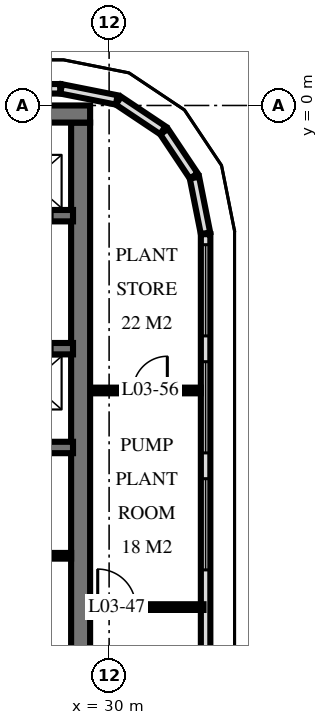
"""IFC4 building model, lengths in metres.
Left out: names, types, materials, properties, quantities, classifications, styles, units other than length and angle.
Written with IfcOpenShell. Run it as: python <this file> out.ifc"""

import sys

from ifc_helpers import new_model, si_unit, direction, frame, frame_2d, origin, place, context, subcontext, project, spatial, rectangle, extrude, element, fill, save


model = new_model("IFC4")
c1 = context("Model", 3, precision=1e-05, world=origin(), true_north=direction((0.0, 1.0)))
c2 = subcontext(c1, "Body", "Model", "MODEL_VIEW")
j1 = project(units=[si_unit("LENGTHUNIT", "METRE"), si_unit("PLANEANGLEUNIT", "RADIAN")], contexts=[c1])
p1 = place(None, origin())
s1 = spatial("IfcSite", under=j1, at=p1, CompositionType="ELEMENT")
p2 = place(p1, origin())
s2 = spatial("IfcBuilding", under=s1, at=p2, CompositionType="ELEMENT")
p3 = place(p2, frame((0.0, 0.0, 18.0)))
s3 = spatial("IfcBuildingStorey", under=s2, at=p3, CompositionType="ELEMENT", Elevation=18.0)
p4 = place(p3, frame((10.0, -0.225, 0.0), z_axis=(0.0, 0.0, 1.0), x_axis=(1.0, 0.0, 0.0)))
e1 = element("IfcWall", 1, at=p4, inside=s3, PredefinedType="SHEAR", context=c2, shape_type="SweptSolid", body=[
    extrude(rectangle(XDim=19.5, YDim=0.45, at=frame_2d((9.75, 0.0))), origin(), (0.0, 0.0, 1.0), 6.0),
])
p5 = place(p3, frame((29.25, -14.55, 0.0), z_axis=(0.0, 0.0, 1.0), x_axis=(0.0, 1.0, 0.0)))
e2 = element("IfcWall", 2, at=p5, inside=s3, PredefinedType="SHEAR", context=c2, shape_type="SweptSolid", body=[
    extrude(rectangle(XDim=14.1, YDim=0.5, at=frame_2d((7.05, 0.0))), origin(), (0.0, 0.0, 1.0), 6.0),
])
p6 = place(p3, frame((10.35, -2.9, 0.0), z_axis=(0.0, 0.0, 1.0), x_axis=(1.0, 0.0, 0.0)))
e3 = element("IfcWall", 3, at=p6, inside=s3, PredefinedType="SHEAR", context=c2, shape_type="SweptSolid", body=[
    extrude(rectangle(XDim=18.7, YDim=0.3, at=frame_2d((9.35, 0.0))), origin(), (0.0, 0.0, 1.0), 6.0),
])
p7 = place(p6, frame((14.65, 0.0, 0.0)))
e4 = element("IfcOpeningElement", 4, at=p7, cuts=e3, PredefinedType="OPENING", context=c2, shape_type="SweptSolid", body=[
    extrude(rectangle(XDim=1.1, YDim=2.1, at=frame_2d((0.55, 1.05))), frame((0.0, 0.16, 0.0), z_axis=(0.0, -1.0, 0.0), x_axis=(1.0, 0.0, 0.0)), (0.0, 0.0, 1.0), 0.32),
])
p8 = place(p6, frame((17.05, 0.0, 0.0)))
e5 = element("IfcOpeningElement", 5, at=p8, cuts=e3, PredefinedType="OPENING", context=c2, shape_type="SweptSolid", body=[
    extrude(rectangle(XDim=1.1, YDim=2.1, at=frame_2d((0.55, 1.05))), frame((0.0, 0.16, 0.0), z_axis=(0.0, -1.0, 0.0), x_axis=(1.0, 0.0, 0.0)), (0.0, 0.0, 1.0), 0.32),
])
p9 = place(p6, frame((6.188, 0.0, 0.0)))
e6 = element("IfcOpeningElement", 6, at=p9, cuts=e3, PredefinedType="OPENING", context=c2, shape_type="SweptSolid", body=[
    extrude(rectangle(XDim=0.9, YDim=2.1, at=frame_2d((0.45, 1.05))), frame((0.0, 0.16, 0.0), z_axis=(0.0, -1.0, 0.0), x_axis=(1.0, 0.0, 0.0)), (0.0, 0.0, 1.0), 0.32),
])
p10 = place(p6, frame((7.613, 0.0, 0.0)))
e7 = element("IfcOpeningElement", 7, at=p10, cuts=e3, PredefinedType="OPENING", context=c2, shape_type="SweptSolid", body=[
    extrude(rectangle(XDim=0.9, YDim=2.1, at=frame_2d((0.45, 1.05))), frame((0.0, 0.16, 0.0), z_axis=(0.0, -1.0, 0.0), x_axis=(1.0, 0.0, 0.0)), (0.0, 0.0, 1.0), 0.32),
])
p11 = place(p6, frame((0.137, 0.0, 0.0)))
e8 = element("IfcOpeningElement", 8, at=p11, cuts=e3, PredefinedType="OPENING", context=c2, shape_type="SweptSolid", body=[
    extrude(rectangle(XDim=1.0, YDim=2.1, at=frame_2d((0.5, 1.05))), frame((0.0, 0.16, 0.0), z_axis=(0.0, -1.0, 0.0), x_axis=(1.0, 0.0, 0.0)), (0.0, 0.0, 1.0), 0.32),
])
p12 = place(p6, frame((1.562, 0.0, 0.0)))
e9 = element("IfcOpeningElement", 9, at=p12, cuts=e3, PredefinedType="OPENING", context=c2, shape_type="SweptSolid", body=[
    extrude(rectangle(XDim=1.0, YDim=2.1, at=frame_2d((0.5, 1.05))), frame((0.0, 0.16, 0.0), z_axis=(0.0, -1.0, 0.0), x_axis=(1.0, 0.0, 0.0)), (0.0, 0.0, 1.0), 0.32),
])
p13 = place(p6, frame((3.85, 0.0, 0.0)))
e10 = element("IfcOpeningElement", 10, at=p13, cuts=e3, PredefinedType="OPENING", context=c2, shape_type="SweptSolid", body=[
    extrude(rectangle(XDim=1.0, YDim=2.1, at=frame_2d((0.5, 1.05))), frame((0.0, 0.16, 0.0), z_axis=(0.0, -1.0, 0.0), x_axis=(1.0, 0.0, 0.0)), (0.0, 0.0, 1.0), 0.32),
])
p14 = place(p6, frame((12.1, 0.0, 0.0)))
e11 = element("IfcOpeningElement", 11, at=p14, cuts=e3, PredefinedType="OPENING", context=c2, shape_type="SweptSolid", body=[
    extrude(rectangle(XDim=1.0, YDim=2.1, at=frame_2d((0.5, 1.05))), frame((0.0, 0.16, 0.0), z_axis=(0.0, -1.0, 0.0), x_axis=(1.0, 0.0, 0.0)), (0.0, 0.0, 1.0), 0.32),
])
p15 = place(p3, frame((10.35, -6.4, 0.0), z_axis=(0.0, 0.0, 1.0), x_axis=(1.0, 0.0, 0.0)))
e12 = element("IfcWall", 12, at=p15, inside=s3, PredefinedType="SHEAR", context=c2, shape_type="SweptSolid", body=[
    extrude(rectangle(XDim=18.7, YDim=0.3, at=frame_2d((9.35, 0.0))), origin(), (0.0, 0.0, 1.0), 6.0),
])
p16 = place(p15, frame((14.65, 0.0, 0.0)))
e13 = element("IfcOpeningElement", 13, at=p16, cuts=e12, PredefinedType="OPENING", context=c2, shape_type="SweptSolid", body=[
    extrude(rectangle(XDim=1.1, YDim=2.1, at=frame_2d((0.55, 1.05))), frame((0.0, 0.16, 0.0), z_axis=(0.0, -1.0, 0.0), x_axis=(1.0, 0.0, 0.0)), (0.0, 0.0, 1.0), 0.32),
])
p17 = place(p15, frame((17.05, 0.0, 0.0)))
e14 = element("IfcOpeningElement", 14, at=p17, cuts=e12, PredefinedType="OPENING", context=c2, shape_type="SweptSolid", body=[
    extrude(rectangle(XDim=1.1, YDim=2.1, at=frame_2d((0.55, 1.05))), frame((0.0, 0.16, 0.0), z_axis=(0.0, -1.0, 0.0), x_axis=(1.0, 0.0, 0.0)), (0.0, 0.0, 1.0), 0.32),
])
p18 = place(p15, frame((6.8, 0.0, 0.0)))
e15 = element("IfcOpeningElement", 15, at=p18, cuts=e12, PredefinedType="OPENING", context=c2, shape_type="SweptSolid", body=[
    extrude(rectangle(XDim=1.1, YDim=2.1, at=frame_2d((0.55, 1.05))), frame((0.0, 0.16, 0.0), z_axis=(0.0, -1.0, 0.0), x_axis=(1.0, 0.0, 0.0)), (0.0, 0.0, 1.0), 0.32),
])
p19 = place(p15, frame((12.1, 0.0, 0.0)))
e16 = element("IfcOpeningElement", 16, at=p19, cuts=e12, PredefinedType="OPENING", context=c2, shape_type="SweptSolid", body=[
    extrude(rectangle(XDim=1.0, YDim=2.1, at=frame_2d((0.5, 1.05))), frame((0.0, 0.16, 0.0), z_axis=(0.0, -1.0, 0.0), x_axis=(1.0, 0.0, 0.0)), (0.0, 0.0, 1.0), 0.32),
])
p20 = place(p3, frame((10.35, -9.0, 0.0), z_axis=(0.0, 0.0, 1.0), x_axis=(1.0, 0.0, 0.0)))
e17 = element("IfcWall", 17, at=p20, inside=s3, PredefinedType="SHEAR", context=c2, shape_type="SweptSolid", body=[
    extrude(rectangle(XDim=18.7, YDim=0.3, at=frame_2d((9.35, 0.0))), origin(), (0.0, 0.0, 1.0), 6.0),
])
p21 = place(p20, frame((3.8, 0.0, 0.0)))
e18 = element("IfcOpeningElement", 18, at=p21, cuts=e17, PredefinedType="OPENING", context=c2, shape_type="SweptSolid", body=[
    extrude(rectangle(XDim=1.1, YDim=2.1, at=frame_2d((0.55, 1.05))), frame((0.0, 0.16, 0.0), z_axis=(0.0, -1.0, 0.0), x_axis=(1.0, 0.0, 0.0)), (0.0, 0.0, 1.0), 0.32),
])
p22 = place(p3, frame((32.537, -3.363, 0.0), z_axis=(0.0, 0.0, 1.0), x_axis=(-0.195014837095, 0.980800292268, 0.0)))
e19 = element("IfcWall", 19, at=p22, inside=s3, PredefinedType="SOLIDWALL", context=c2, shape_type="SweptSolid", body=[
    extrude(rectangle(XDim=1.492, YDim=0.25, at=frame_2d((0.746, 0.0))), origin(), (0.0, 0.0, 1.0), 5.72),
])
for number, where, z_axis, x_axis in (
    (20, (32.227, -1.854, 0.0), (0.0, 0.0, 1.0), (-0.556, 0.831, 0.0)),
    (21, (31.413, -0.653, 0.0), (0.0, 0.0, 1.0), (-0.831, 0.556, 0.0)),
):
    element("IfcWall", number, at=place(p3, frame(where, z_axis=z_axis, x_axis=x_axis)), inside=s3, PredefinedType="SOLIDWALL", context=c2, shape_type="SweptSolid", body=[
        extrude(rectangle(XDim=1.403, YDim=0.25, at=frame_2d((0.702, 0.0))), origin(), (0.0, 0.0, 1.0), 5.72),
    ])
p23 = place(p3, frame((30.201, 0.146, 0.0), z_axis=(0.0, 0.0, 1.0), x_axis=(-0.980800292268, 0.195014837095, 0.0)))
e22 = element("IfcWall", 22, at=p23, inside=s3, PredefinedType="SOLIDWALL", context=c2, shape_type="SweptSolid", body=[
    extrude(rectangle(XDim=1.492, YDim=0.25, at=frame_2d((0.746, 0.0))), origin(), (0.0, 0.0, 1.0), 5.72),
])
p24 = place(p3, frame((28.713, 0.439, 0.0), z_axis=(0.0, 0.0, 1.0), x_axis=(-1.0, 0.0, 0.0)))
e23 = element("IfcWall", 23, at=p24, inside=s3, PredefinedType="SOLIDWALL", context=c2, shape_type="SweptSolid", body=[
    extrude(rectangle(XDim=57.426, YDim=0.25, at=frame_2d((28.713, 0.0))), origin(), (0.0, 0.0, 1.0), 5.72),
])
p25 = place(p24, frame((0.252, 0.0, 0.858)))
e24 = element("IfcOpeningElement", 24, at=p25, cuts=e23, PredefinedType="OPENING", context=c2, shape_type="SweptSolid", body=[
    extrude(rectangle(XDim=2.4, YDim=3.6, at=frame_2d((1.2, 1.8))), frame((0.0, 0.135, 0.0), z_axis=(0.0, -1.0, 0.0), x_axis=(1.0, 0.0, 0.0)), (0.0, 0.0, 1.0), 0.27),
])
p26 = place(p24, frame((3.281, 0.0, 0.858)))
e25 = element("IfcOpeningElement", 25, at=p26, cuts=e23, PredefinedType="OPENING", context=c2, shape_type="SweptSolid", body=[
    extrude(rectangle(XDim=2.4, YDim=3.6, at=frame_2d((1.2, 1.8))), frame((0.0, 0.135, 0.0), z_axis=(0.0, -1.0, 0.0), x_axis=(1.0, 0.0, 0.0)), (0.0, 0.0, 1.0), 0.27),
])
p27 = place(p24, frame((6.31, 0.0, 0.858)))
e26 = element("IfcOpeningElement", 26, at=p27, cuts=e23, PredefinedType="OPENING", context=c2, shape_type="SweptSolid", body=[
    extrude(rectangle(XDim=2.4, YDim=3.6, at=frame_2d((1.2, 1.8))), frame((0.0, 0.135, 0.0), z_axis=(0.0, -1.0, 0.0), x_axis=(1.0, 0.0, 0.0)), (0.0, 0.0, 1.0), 0.27),
])
p28 = place(p24, frame((9.339, 0.0, 0.858)))
e27 = element("IfcOpeningElement", 27, at=p28, cuts=e23, PredefinedType="OPENING", context=c2, shape_type="SweptSolid", body=[
    extrude(rectangle(XDim=2.4, YDim=3.6, at=frame_2d((1.2, 1.8))), frame((0.0, 0.135, 0.0), z_axis=(0.0, -1.0, 0.0), x_axis=(1.0, 0.0, 0.0)), (0.0, 0.0, 1.0), 0.27),
])
p29 = place(p24, frame((12.368, 0.0, 0.858)))
e28 = element("IfcOpeningElement", 28, at=p29, cuts=e23, PredefinedType="OPENING", context=c2, shape_type="SweptSolid", body=[
    extrude(rectangle(XDim=2.4, YDim=3.6, at=frame_2d((1.2, 1.8))), frame((0.0, 0.135, 0.0), z_axis=(0.0, -1.0, 0.0), x_axis=(1.0, 0.0, 0.0)), (0.0, 0.0, 1.0), 0.27),
])
p30 = place(p24, frame((15.397, 0.0, 0.858)))
e29 = element("IfcOpeningElement", 29, at=p30, cuts=e23, PredefinedType="OPENING", context=c2, shape_type="SweptSolid", body=[
    extrude(rectangle(XDim=2.4, YDim=3.6, at=frame_2d((1.2, 1.8))), frame((0.0, 0.135, 0.0), z_axis=(0.0, -1.0, 0.0), x_axis=(1.0, 0.0, 0.0)), (0.0, 0.0, 1.0), 0.27),
])
p31 = place(p24, frame((18.426, 0.0, 0.858)))
e30 = element("IfcOpeningElement", 30, at=p31, cuts=e23, PredefinedType="OPENING", context=c2, shape_type="SweptSolid", body=[
    extrude(rectangle(XDim=2.4, YDim=3.6, at=frame_2d((1.2, 1.8))), frame((0.0, 0.135, 0.0), z_axis=(0.0, -1.0, 0.0), x_axis=(1.0, 0.0, 0.0)), (0.0, 0.0, 1.0), 0.27),
])
p32 = place(p24, frame((21.455, 0.0, 0.858)))
e31 = element("IfcOpeningElement", 31, at=p32, cuts=e23, PredefinedType="OPENING", context=c2, shape_type="SweptSolid", body=[
    extrude(rectangle(XDim=2.4, YDim=3.6, at=frame_2d((1.2, 1.8))), frame((0.0, 0.135, 0.0), z_axis=(0.0, -1.0, 0.0), x_axis=(1.0, 0.0, 0.0)), (0.0, 0.0, 1.0), 0.27),
])
p33 = place(p24, frame((24.484, 0.0, 0.858)))
e32 = element("IfcOpeningElement", 32, at=p33, cuts=e23, PredefinedType="OPENING", context=c2, shape_type="SweptSolid", body=[
    extrude(rectangle(XDim=2.4, YDim=3.6, at=frame_2d((1.2, 1.8))), frame((0.0, 0.135, 0.0), z_axis=(0.0, -1.0, 0.0), x_axis=(1.0, 0.0, 0.0)), (0.0, 0.0, 1.0), 0.27),
])
p34 = place(p24, frame((27.513, 0.0, 0.858)))
e33 = element("IfcOpeningElement", 33, at=p34, cuts=e23, PredefinedType="OPENING", context=c2, shape_type="SweptSolid", body=[
    extrude(rectangle(XDim=2.4, YDim=3.6, at=frame_2d((1.2, 1.8))), frame((0.0, 0.135, 0.0), z_axis=(0.0, -1.0, 0.0), x_axis=(1.0, 0.0, 0.0)), (0.0, 0.0, 1.0), 0.27),
])
p35 = place(p24, frame((30.542, 0.0, 0.858)))
e34 = element("IfcOpeningElement", 34, at=p35, cuts=e23, PredefinedType="OPENING", context=c2, shape_type="SweptSolid", body=[
    extrude(rectangle(XDim=2.4, YDim=3.6, at=frame_2d((1.2, 1.8))), frame((0.0, 0.135, 0.0), z_axis=(0.0, -1.0, 0.0), x_axis=(1.0, 0.0, 0.0)), (0.0, 0.0, 1.0), 0.27),
])
p36 = place(p24, frame((33.571, 0.0, 0.858)))
e35 = element("IfcOpeningElement", 35, at=p36, cuts=e23, PredefinedType="OPENING", context=c2, shape_type="SweptSolid", body=[
    extrude(rectangle(XDim=2.4, YDim=3.6, at=frame_2d((1.2, 1.8))), frame((0.0, 0.135, 0.0), z_axis=(0.0, -1.0, 0.0), x_axis=(1.0, 0.0, 0.0)), (0.0, 0.0, 1.0), 0.27),
])
p37 = place(p24, frame((36.6, 0.0, 0.858)))
e36 = element("IfcOpeningElement", 36, at=p37, cuts=e23, PredefinedType="OPENING", context=c2, shape_type="SweptSolid", body=[
    extrude(rectangle(XDim=2.4, YDim=3.6, at=frame_2d((1.2, 1.8))), frame((0.0, 0.135, 0.0), z_axis=(0.0, -1.0, 0.0), x_axis=(1.0, 0.0, 0.0)), (0.0, 0.0, 1.0), 0.27),
])
p38 = place(p24, frame((39.629, 0.0, 0.858)))
e37 = element("IfcOpeningElement", 37, at=p38, cuts=e23, PredefinedType="OPENING", context=c2, shape_type="SweptSolid", body=[
    extrude(rectangle(XDim=2.4, YDim=3.6, at=frame_2d((1.2, 1.8))), frame((0.0, 0.135, 0.0), z_axis=(0.0, -1.0, 0.0), x_axis=(1.0, 0.0, 0.0)), (0.0, 0.0, 1.0), 0.27),
])
p39 = place(p24, frame((42.658, 0.0, 0.858)))
e38 = element("IfcOpeningElement", 38, at=p39, cuts=e23, PredefinedType="OPENING", context=c2, shape_type="SweptSolid", body=[
    extrude(rectangle(XDim=2.4, YDim=3.6, at=frame_2d((1.2, 1.8))), frame((0.0, 0.135, 0.0), z_axis=(0.0, -1.0, 0.0), x_axis=(1.0, 0.0, 0.0)), (0.0, 0.0, 1.0), 0.27),
])
p40 = place(p24, frame((45.687, 0.0, 0.858)))
e39 = element("IfcOpeningElement", 39, at=p40, cuts=e23, PredefinedType="OPENING", context=c2, shape_type="SweptSolid", body=[
    extrude(rectangle(XDim=2.4, YDim=3.6, at=frame_2d((1.2, 1.8))), frame((0.0, 0.135, 0.0), z_axis=(0.0, -1.0, 0.0), x_axis=(1.0, 0.0, 0.0)), (0.0, 0.0, 1.0), 0.27),
])
p41 = place(p24, frame((48.716, 0.0, 0.858)))
e40 = element("IfcOpeningElement", 40, at=p41, cuts=e23, PredefinedType="OPENING", context=c2, shape_type="SweptSolid", body=[
    extrude(rectangle(XDim=2.4, YDim=3.6, at=frame_2d((1.2, 1.8))), frame((0.0, 0.135, 0.0), z_axis=(0.0, -1.0, 0.0), x_axis=(1.0, 0.0, 0.0)), (0.0, 0.0, 1.0), 0.27),
])
p42 = place(p24, frame((51.745, 0.0, 0.858)))
e41 = element("IfcOpeningElement", 41, at=p42, cuts=e23, PredefinedType="OPENING", context=c2, shape_type="SweptSolid", body=[
    extrude(rectangle(XDim=2.4, YDim=3.6, at=frame_2d((1.2, 1.8))), frame((0.0, 0.135, 0.0), z_axis=(0.0, -1.0, 0.0), x_axis=(1.0, 0.0, 0.0)), (0.0, 0.0, 1.0), 0.27),
])
p43 = place(p24, frame((54.774, 0.0, 0.858)))
e42 = element("IfcOpeningElement", 42, at=p43, cuts=e23, PredefinedType="OPENING", context=c2, shape_type="SweptSolid", body=[
    extrude(rectangle(XDim=2.4, YDim=3.6, at=frame_2d((1.2, 1.8))), frame((0.0, 0.135, 0.0), z_axis=(0.0, -1.0, 0.0), x_axis=(1.0, 0.0, 0.0)), (0.0, 0.0, 1.0), 0.27),
])
p44 = place(p3, frame((32.539, -15.639, 0.0), z_axis=(0.0, 0.0, 1.0), x_axis=(0.0, 1.0, 0.0)))
e43 = element("IfcWall", 43, at=p44, inside=s3, PredefinedType="SOLIDWALL", context=c2, shape_type="SweptSolid", body=[
    extrude(rectangle(XDim=12.252, YDim=0.25, at=frame_2d((6.126, 0.0))), origin(), (0.0, 0.0, 1.0), 5.72),
])
p45 = place(p44, frame((3.418, 0.0, 1.005)))
e44 = element("IfcOpeningElement", 44, at=p45, cuts=e43, PredefinedType="OPENING", context=c2, shape_type="SweptSolid", body=[
    extrude(rectangle(XDim=2.4, YDim=3.6, at=frame_2d((1.2, 1.8))), frame((0.0, 0.135, 0.0), z_axis=(0.0, -1.0, 0.0), x_axis=(1.0, 0.0, 0.0)), (0.0, 0.0, 1.0), 0.27),
])
p46 = place(p44, frame((6.497, 0.0, 1.005)))
e45 = element("IfcOpeningElement", 45, at=p46, cuts=e43, PredefinedType="OPENING", context=c2, shape_type="SweptSolid", body=[
    extrude(rectangle(XDim=2.4, YDim=3.6, at=frame_2d((1.2, 1.8))), frame((0.0, 0.135, 0.0), z_axis=(0.0, -1.0, 0.0), x_axis=(1.0, 0.0, 0.0)), (0.0, 0.0, 1.0), 0.27),
])
p47 = place(p44, frame((9.575, 0.0, 1.005)))
e46 = element("IfcOpeningElement", 46, at=p47, cuts=e43, PredefinedType="OPENING", context=c2, shape_type="SweptSolid", body=[
    extrude(rectangle(XDim=2.4, YDim=3.6, at=frame_2d((1.2, 1.8))), frame((0.0, 0.135, 0.0), z_axis=(0.0, -1.0, 0.0), x_axis=(1.0, 0.0, 0.0)), (0.0, 0.0, 1.0), 0.27),
])
p48 = place(p3, frame((24.5, -11.85, 0.0), z_axis=(0.0, 0.0, 1.0), x_axis=(1.0, 0.0, 0.0)))
e47 = element("IfcWall", 47, at=p48, inside=s3, PredefinedType="PARTITIONING", context=c2, shape_type="SweptSolid", body=[
    extrude(rectangle(XDim=4.5, YDim=0.15, at=frame_2d((2.25, 0.0))), origin(), (0.0, 0.0, 1.0), 5.7),
])
p49 = place(p48, frame((1.75, 0.0, 0.0)))
e48 = element("IfcOpeningElement", 48, at=p49, cuts=e47, PredefinedType="OPENING", context=c2, shape_type="SweptSolid", body=[
    extrude(rectangle(XDim=1.0, YDim=2.1, at=frame_2d((0.5, 1.05))), frame((0.0, 0.085, 0.0), z_axis=(0.0, -1.0, 0.0), x_axis=(1.0, 0.0, 0.0)), (0.0, 0.0, 1.0), 0.17),
])
p50 = place(p3, frame((29.55, -13.2, 0.0), z_axis=(0.0, 0.0, 1.0), x_axis=(1.0, 0.0, 0.0)))
e49 = element("IfcWall", 49, at=p50, inside=s3, PredefinedType="PARTITIONING", context=c2, shape_type="SweptSolid", body=[
    extrude(rectangle(XDim=2.934, YDim=0.15, at=frame_2d((1.467, 0.0))), origin(), (0.0, 0.0, 1.0), 5.55),
])
p51 = place(p50, frame((0.15, 0.0, 0.0)))
e50 = element("IfcOpeningElement", 50, at=p51, cuts=e49, PredefinedType="OPENING", context=c2, shape_type="SweptSolid", body=[
    extrude(rectangle(XDim=1.0, YDim=2.1, at=frame_2d((0.5, 1.05))), frame((0.0, 0.085, 0.0), z_axis=(0.0, -1.0, 0.0), x_axis=(1.0, 0.0, 0.0)), (0.0, 0.0, 1.0), 0.17),
])
p52 = place(p3, frame((29.55, -7.5, 0.0), z_axis=(0.0, 0.0, 1.0), x_axis=(1.0, 0.0, 0.0)))
e51 = element("IfcWall", 51, at=p52, inside=s3, PredefinedType="PARTITIONING", context=c2, shape_type="SweptSolid", body=[
    extrude(rectangle(XDim=2.863, YDim=0.15, at=frame_2d((1.431, 0.0))), origin(), (0.0, 0.0, 1.0), 5.55),
])
p53 = place(p52, frame((1.082, 0.0, 0.0)))
e52 = element("IfcOpeningElement", 52, at=p53, cuts=e51, PredefinedType="OPENING", context=c2, shape_type="SweptSolid", body=[
    extrude(rectangle(XDim=0.9, YDim=2.1, at=frame_2d((0.45, 1.05))), frame((0.0, 0.085, 0.0), z_axis=(0.0, -1.0, 0.0), x_axis=(1.0, 0.0, 0.0)), (0.0, 0.0, 1.0), 0.17),
])
p54 = place(p45, origin())
e53 = element("IfcWindow", 53, at=p54, inside=s3, PartitioningType="SINGLE_PANEL", PredefinedType="USERDEFINED", context=c2, shape_type="SweptSolid", body=[
    extrude(rectangle(XDim=2.4, YDim=3.6, at=frame_2d((1.2, 1.8))), frame((0.0, 0.125, 0.0), z_axis=(0.0, -1.0, 0.0), x_axis=(1.0, 0.0, 0.0)), (0.0, 0.0, 1.0), 0.06),
])
fill(e44, e53)
p55 = place(p46, origin())
e54 = element("IfcWindow", 54, at=p55, inside=s3, PartitioningType="SINGLE_PANEL", PredefinedType="USERDEFINED", context=c2, shape_type="SweptSolid", body=[
    extrude(rectangle(XDim=2.4, YDim=3.6, at=frame_2d((1.2, 1.8))), frame((0.0, 0.125, 0.0), z_axis=(0.0, -1.0, 0.0), x_axis=(1.0, 0.0, 0.0)), (0.0, 0.0, 1.0), 0.06),
])
fill(e45, e54)
p56 = place(p47, origin())
e55 = element("IfcWindow", 55, at=p56, inside=s3, PartitioningType="SINGLE_PANEL", PredefinedType="USERDEFINED", context=c2, shape_type="SweptSolid", body=[
    extrude(rectangle(XDim=2.4, YDim=3.6, at=frame_2d((1.2, 1.8))), frame((0.0, 0.125, 0.0), z_axis=(0.0, -1.0, 0.0), x_axis=(1.0, 0.0, 0.0)), (0.0, 0.0, 1.0), 0.06),
])
fill(e46, e55)
p57 = place(p8, origin())
e56 = element("IfcDoor", 56, at=p57, inside=s3, OperationType="DOUBLE_DOOR_SLIDING", PredefinedType="USERDEFINED", context=c2, shape_type="SweptSolid", body=[
    extrude(rectangle(XDim=1.1, YDim=2.1, at=frame_2d((0.55, 1.05))), frame((0.0, 0.025, 0.0), z_axis=(0.0, -1.0, 0.0), x_axis=(1.0, 0.0, 0.0)), (0.0, 0.0, 1.0), 0.05),
])
fill(e5, e56)
p58 = place(p17, origin())
e57 = element("IfcDoor", 57, at=p58, inside=s3, OperationType="DOUBLE_DOOR_SLIDING", PredefinedType="USERDEFINED", context=c2, shape_type="SweptSolid", body=[
    extrude(rectangle(XDim=1.1, YDim=2.1, at=frame_2d((0.55, 1.05))), frame((0.0, 0.025, 0.0), z_axis=(0.0, -1.0, 0.0), x_axis=(1.0, 0.0, 0.0)), (0.0, 0.0, 1.0), 0.05),
])
fill(e14, e57)
p59 = place(p51, origin())
e58 = element("IfcDoor", 58, at=p59, inside=s3, OperationType="SINGLE_SWING_RIGHT", PredefinedType="DOOR", context=c2, shape_type="SweptSolid", body=[
    extrude(rectangle(XDim=1.0, YDim=2.1, at=frame_2d((0.5, 1.05))), frame((0.0, 0.025, 0.0), z_axis=(0.0, -1.0, 0.0), x_axis=(1.0, 0.0, 0.0)), (0.0, 0.0, 1.0), 0.05),
])
fill(e50, e58)
p60 = place(p53, origin())
e59 = element("IfcDoor", 59, at=p60, inside=s3, OperationType="SINGLE_SWING_LEFT", PredefinedType="DOOR", context=c2, shape_type="SweptSolid", body=[
    extrude(rectangle(XDim=0.9, YDim=2.1, at=frame_2d((0.45, 1.05))), frame((0.0, 0.025, 0.0), z_axis=(0.0, -1.0, 0.0), x_axis=(1.0, 0.0, 0.0)), (0.0, 0.0, 1.0), 0.05),
])
fill(e52, e59)
save(model, sys.argv[1])
